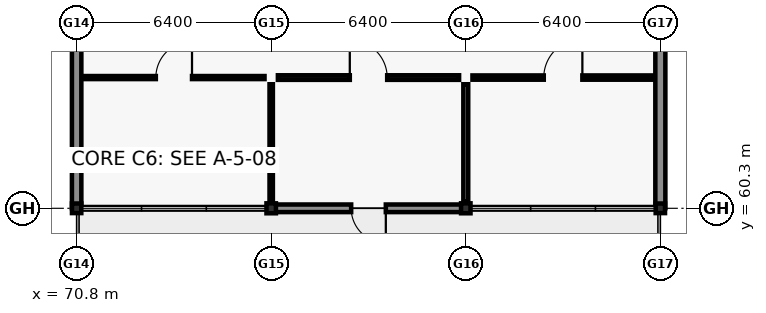
"""IFC4 building model, lengths in metres.
Left out: names, types, materials, properties, quantities, classifications, styles, units other than length and angle.
Written with IfcOpenShell. Run it as: python <this file> out.ifc"""

import sys

from ifc_helpers import new_model, si_unit, direction, frame, frame_2d, origin, origin_2d, place, context, subcontext, project, spatial, rectangle, i_section, extrude, element, fill, save


model = new_model("IFC4")
c1 = context("Model", 3, precision=1e-05, world=origin(), true_north=direction((0.0, 1.0)))
c2 = subcontext(c1, "Body", "Model", "MODEL_VIEW")
j1 = project(units=[si_unit("LENGTHUNIT", "METRE"), si_unit("PLANEANGLEUNIT", "RADIAN")], contexts=[c1])
p1 = place(None, origin())
s1 = spatial("IfcSite", under=j1, at=p1, CompositionType="ELEMENT")
p2 = place(p1, origin())
s2 = spatial("IfcBuilding", under=s1, at=p2, CompositionType="ELEMENT")
p3 = place(p2, frame((0.0, 0.0, 5.4)))
s3 = spatial("IfcBuildingStorey", under=s2, at=p3, CompositionType="ELEMENT", Elevation=5.4)
p4 = place(p3, frame((70.8, 60.3, 0.0), z_axis=(0.0, 0.0, 1.0), x_axis=(1.0, 0.0, 0.0)))
e1 = element("IfcColumn", 1, at=p4, inside=s3, PredefinedType="COLUMN", context=c2, shape_type="SweptSolid", body=[
    extrude(i_section(OverallWidth=0.307, OverallDepth=0.315, WebThickness=0.012, FlangeThickness=0.019, FilletRadius=0.017, at=origin_2d()), origin(), (0.0, 0.0, 1.0), 4.2),
])
for number, where, z_axis, x_axis in (
    (2, (77.2, 60.3, 0.0), (0.0, 0.0, 1.0), (1.0, 0.0, 0.0)),
    (3, (83.6, 60.3, 0.0), (0.0, 0.0, 1.0), (1.0, 0.0, 0.0)),
):
    element("IfcColumn", number, at=place(p3, frame(where, z_axis=z_axis, x_axis=x_axis)), inside=s3, PredefinedType="COLUMN", context=c2, shape_type="SweptSolid", body=[
        extrude(i_section(OverallWidth=0.311, OverallDepth=0.327, WebThickness=0.016, FlangeThickness=0.025, FilletRadius=0.017, at=origin_2d()), origin(), (0.0, 0.0, 1.0), 4.2),
    ])
p5 = place(p3, frame((90.0, 60.3, 0.0), z_axis=(0.0, 0.0, 1.0), x_axis=(1.0, 0.0, 0.0)))
e4 = element("IfcColumn", 4, at=p5, inside=s3, PredefinedType="COLUMN", context=c2, shape_type="SweptSolid", body=[
    extrude(i_section(OverallWidth=0.307, OverallDepth=0.315, WebThickness=0.012, FlangeThickness=0.019, FilletRadius=0.017, at=origin_2d()), origin(), (0.0, 0.0, 1.0), 4.2),
])
p6 = place(p3, frame((83.595, 60.3, 0.0), z_axis=(0.0, 0.0, 1.0), x_axis=(-1.0, 0.0, 0.0)))
e5 = element("IfcWall", 5, at=p6, inside=s3, PredefinedType="SOLIDWALL", context=c2, shape_type="SweptSolid", body=[
    extrude(rectangle(XDim=6.39, YDim=0.25, at=frame_2d((3.195, 0.0))), origin(), (0.0, 0.0, 1.0), 3.32),
])
p7 = place(p6, frame((2.625, 0.0, 0.0)))
e6 = element("IfcOpeningElement", 6, at=p7, cuts=e5, PredefinedType="OPENING", context=c2, shape_type="SweptSolid", body=[
    extrude(rectangle(XDim=1.14, YDim=2.14, at=frame_2d((0.57, 1.07))), frame((0.0, 0.135, 0.0), z_axis=(0.0, -1.0, 0.0), x_axis=(1.0, 0.0, 0.0)), (0.0, 0.0, 1.0), 0.27),
])
p8 = place(p3, frame((70.8, 60.305, 0.0), z_axis=(0.0, 0.0, 1.0), x_axis=(0.0, 1.0, 0.0)))
e7 = element("IfcWall", 7, at=p8, inside=s3, PredefinedType="SOLIDWALL", context=c2, shape_type="SweptSolid", body=[
    extrude(rectangle(XDim=6.89, YDim=0.31, at=frame_2d((3.445, 0.0))), origin(), (0.0, 0.0, 1.0), 3.32),
])
p9 = place(p3, frame((90.0, 67.195, 0.0), z_axis=(0.0, 0.0, 1.0), x_axis=(0.0, -1.0, 0.0)))
e8 = element("IfcWall", 8, at=p9, inside=s3, PredefinedType="SOLIDWALL", context=c2, shape_type="SweptSolid", body=[
    extrude(rectangle(XDim=6.89, YDim=0.33, at=frame_2d((3.445, 0.0))), origin(), (0.0, 0.0, 1.0), 3.32),
])
p10 = place(p3, frame((77.2, 60.52, 0.0), z_axis=(0.0, 0.0, 1.0), x_axis=(0.0, 1.0, 0.0)))
e9 = element("IfcWall", 9, at=p10, inside=s3, PredefinedType="PARTITIONING", context=c2, shape_type="SweptSolid", body=[
    extrude(rectangle(XDim=3.86, YDim=0.11, at=frame_2d((1.93, 0.0))), origin(), (0.0, 0.0, 1.0), 3.3),
])
p11 = place(p3, frame((71.02, 64.6, 0.0), z_axis=(0.0, 0.0, 1.0), x_axis=(1.0, 0.0, 0.0)))
e10 = element("IfcWall", 10, at=p11, inside=s3, PredefinedType="PARTITIONING", context=c2, shape_type="SweptSolid", body=[
    extrude(rectangle(XDim=5.96, YDim=0.1, at=frame_2d((2.98, 0.0))), origin(), (0.0, 0.0, 1.0), 3.3),
])
p12 = place(p11, frame((2.385, 0.0, 0.0)))
e11 = element("IfcOpeningElement", 11, at=p12, cuts=e10, PredefinedType="OPENING", context=c2, shape_type="SweptSolid", body=[
    extrude(rectangle(XDim=1.19, YDim=2.14, at=frame_2d((0.595, 1.07))), frame((0.0, 0.06, 0.0), z_axis=(0.0, -1.0, 0.0), x_axis=(1.0, 0.0, 0.0)), (0.0, 0.0, 1.0), 0.12),
])
p13 = place(p3, frame((83.6, 60.52, 0.0), z_axis=(0.0, 0.0, 1.0), x_axis=(0.0, 1.0, 0.0)))
e12 = element("IfcWall", 12, at=p13, inside=s3, PredefinedType="PARTITIONING", context=c2, shape_type="SweptSolid", body=[
    extrude(rectangle(XDim=3.86, YDim=0.16, at=frame_2d((1.93, 0.0))), origin(), (0.0, 0.0, 1.0), 3.3),
])
p14 = place(p3, frame((77.42, 64.6, 0.0), z_axis=(0.0, 0.0, 1.0), x_axis=(1.0, 0.0, 0.0)))
e13 = element("IfcWall", 13, at=p14, inside=s3, PredefinedType="PARTITIONING", context=c2, shape_type="SweptSolid", body=[
    extrude(rectangle(XDim=5.96, YDim=0.15, at=frame_2d((2.98, 0.0))), origin(), (0.0, 0.0, 1.0), 3.3),
])
p15 = place(p14, frame((2.365, 0.0, 0.0)))
e14 = element("IfcOpeningElement", 14, at=p15, cuts=e13, PredefinedType="OPENING", context=c2, shape_type="SweptSolid", body=[
    extrude(rectangle(XDim=1.23, YDim=2.08, at=frame_2d((0.615, 1.04))), frame((0.0, 0.085, 0.0), z_axis=(0.0, -1.0, 0.0), x_axis=(1.0, 0.0, 0.0)), (0.0, 0.0, 1.0), 0.17),
])
p16 = place(p3, frame((83.82, 64.6, 0.0), z_axis=(0.0, 0.0, 1.0), x_axis=(1.0, 0.0, 0.0)))
e15 = element("IfcWall", 15, at=p16, inside=s3, PredefinedType="PARTITIONING", context=c2, shape_type="SweptSolid", body=[
    extrude(rectangle(XDim=5.96, YDim=0.14, at=frame_2d((2.98, 0.0))), origin(), (0.0, 0.0, 1.0), 3.3),
])
p17 = place(p16, frame((2.345, 0.0, 0.0)))
e16 = element("IfcOpeningElement", 16, at=p17, cuts=e15, PredefinedType="OPENING", context=c2, shape_type="SweptSolid", body=[
    extrude(rectangle(XDim=1.27, YDim=2.1, at=frame_2d((0.635, 1.05))), frame((0.0, 0.08, 0.0), z_axis=(0.0, -1.0, 0.0), x_axis=(1.0, 0.0, 0.0)), (0.0, 0.0, 1.0), 0.16),
])
p18 = place(p7, origin())
e17 = element("IfcDoor", 17, at=p18, inside=s3, OperationType="SINGLE_SWING_LEFT", PredefinedType="DOOR", context=c2, shape_type="SweptSolid", body=[
    extrude(rectangle(XDim=1.14, YDim=2.14, at=frame_2d((0.57, 1.07))), frame((0.0, 0.025, 0.0), z_axis=(0.0, -1.0, 0.0), x_axis=(1.0, 0.0, 0.0)), (0.0, 0.0, 1.0), 0.05),
])
fill(e6, e17)
p19 = place(p12, origin())
e18 = element("IfcDoor", 18, at=p19, inside=s3, OperationType="SINGLE_SWING_RIGHT", PredefinedType="DOOR", context=c2, shape_type="SweptSolid", body=[
    extrude(rectangle(XDim=1.19, YDim=2.14, at=frame_2d((0.595, 1.07))), frame((0.0, 0.025, 0.0), z_axis=(0.0, -1.0, 0.0), x_axis=(1.0, 0.0, 0.0)), (0.0, 0.0, 1.0), 0.05),
])
fill(e11, e18)
p20 = place(p15, origin())
e19 = element("IfcDoor", 19, at=p20, inside=s3, OperationType="SINGLE_SWING_LEFT", PredefinedType="DOOR", context=c2, shape_type="SweptSolid", body=[
    extrude(rectangle(XDim=1.23, YDim=2.08, at=frame_2d((0.615, 1.04))), frame((0.0, 0.025, 0.0), z_axis=(0.0, -1.0, 0.0), x_axis=(1.0, 0.0, 0.0)), (0.0, 0.0, 1.0), 0.05),
])
fill(e14, e19)
p21 = place(p17, origin())
e20 = element("IfcDoor", 20, at=p21, inside=s3, OperationType="SINGLE_SWING_RIGHT", PredefinedType="DOOR", context=c2, shape_type="SweptSolid", body=[
    extrude(rectangle(XDim=1.27, YDim=2.1, at=frame_2d((0.635, 1.05))), frame((0.0, 0.025, 0.0), z_axis=(0.0, -1.0, 0.0), x_axis=(1.0, 0.0, 0.0)), (0.0, 0.0, 1.0), 0.05),
])
fill(e16, e20)
save(model, sys.argv[1])
